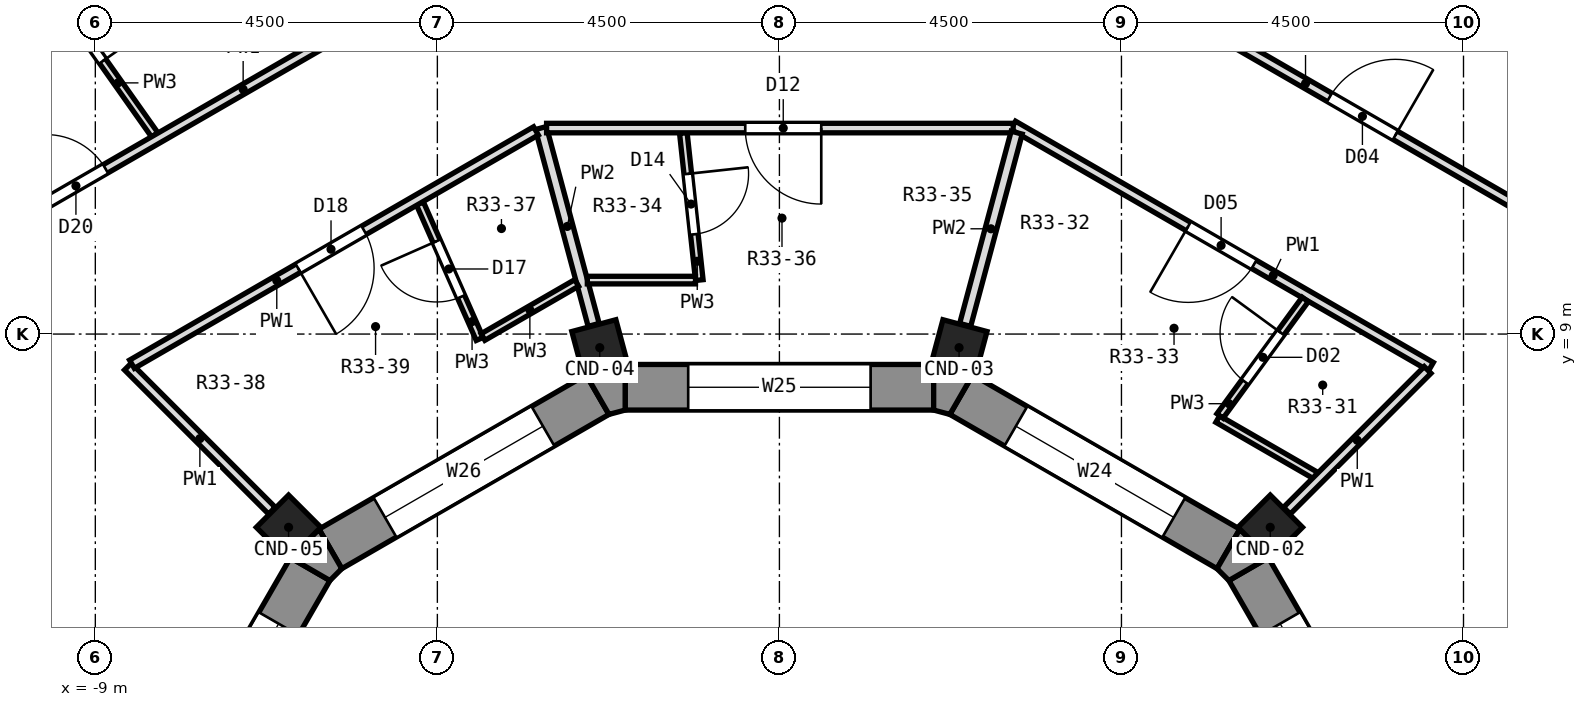
"""IFC4 building model, lengths in metres.
Left out: names, types, materials, properties, quantities, classifications, styles, units other than length and angle.
Written with IfcOpenShell. Run it as: python <this file> out.ifc"""

import sys

from ifc_helpers import new_model, si_unit, direction, frame, frame_2d, origin, origin_2d, place, context, subcontext, project, spatial, polyline, rectangle, outline, extrude, element, fill, save


model = new_model("IFC4")
c1 = context("Model", 3, precision=1e-05, world=origin(), true_north=direction((0.0, 1.0)))
c2 = subcontext(c1, "Body", "Model", "MODEL_VIEW")
j1 = project(units=[si_unit("LENGTHUNIT", "METRE"), si_unit("PLANEANGLEUNIT", "RADIAN")], contexts=[c1])
p1 = place(None, origin())
s1 = spatial("IfcSite", under=j1, at=p1, CompositionType="ELEMENT")
p2 = place(p1, origin())
s2 = spatial("IfcBuilding", under=s1, at=p2, CompositionType="ELEMENT")
p3 = place(p2, frame((0.0, 0.0, 229.7)))
s3 = spatial("IfcBuildingStorey", under=s2, at=p3, CompositionType="ELEMENT", Elevation=229.7)
for number, where, z_axis, x_axis in (
    (1, (6.458, 6.458, 0.0), (0.0, 0.0, 1.0), (0.707, 0.707, 0.0)),
    (2, (2.364, 8.821, 0.0), (0.0, 0.0, 1.0), (0.259, 0.966, 0.0)),
    (3, (-2.364, 8.821, 0.0), (0.0, 0.0, 1.0), (-0.259, 0.966, 0.0)),
    (4, (-6.458, 6.458, 0.0), (0.0, 0.0, 1.0), (-0.707, 0.707, 0.0)),
):
    element("IfcColumn", number, at=place(p3, frame(where, z_axis=z_axis, x_axis=x_axis)), inside=s3, PredefinedType="COLUMN", context=c2, shape_type="SweptSolid", body=[
        extrude(rectangle(XDim=0.6, YDim=0.6, at=origin_2d()), origin(), (0.0, 0.0, 1.0), 3.3),
    ])
p4 = place(p3, frame((8.203, 2.393, 0.0), z_axis=(0.0, 0.0, 1.0), x_axis=(-0.499994954979, 0.866028316509, 0.0)))
e5 = element("IfcWall", 5, at=p4, inside=s3, PredefinedType="SOLIDWALL", context=c2, shape_type="SweptSolid", body=[
    extrude(rectangle(XDim=4.059, YDim=0.6, at=frame_2d((2.029, 0.0))), origin(), (0.0, 0.0, 1.0), 2.9),
])
p5 = place(p4, frame((0.829, 0.0, 0.9)))
e6 = element("IfcOpeningElement", 6, at=p5, cuts=e5, PredefinedType="OPENING", context=c2, shape_type="SweptSolid", body=[
    extrude(rectangle(XDim=2.4, YDim=1.8, at=frame_2d((1.2, 0.9))), frame((0.0, 0.312, 0.0), z_axis=(0.0, -1.0, 0.0), x_axis=(1.0, 0.0, 0.0)), (0.0, 0.0, 1.0), 0.624),
])
p6 = place(p3, frame((5.907, 6.173, 0.0), z_axis=(0.0, 0.0, 1.0), x_axis=(-0.866028316509, 0.499994954979, 0.0)))
e7 = element("IfcWall", 7, at=p6, inside=s3, PredefinedType="SOLIDWALL", context=c2, shape_type="SweptSolid", body=[
    extrude(rectangle(XDim=4.059, YDim=0.6, at=frame_2d((2.029, 0.0))), origin(), (0.0, 0.0, 1.0), 2.9),
])
p7 = place(p6, frame((0.829, 0.0, 0.9)))
e8 = element("IfcOpeningElement", 8, at=p7, cuts=e7, PredefinedType="OPENING", context=c2, shape_type="SweptSolid", body=[
    extrude(rectangle(XDim=2.4, YDim=1.8, at=frame_2d((1.2, 0.9))), frame((0.0, 0.312, 0.0), z_axis=(0.0, -1.0, 0.0), x_axis=(1.0, 0.0, 0.0)), (0.0, 0.0, 1.0), 0.624),
])
p8 = place(p3, frame((2.029, 8.3, 0.0), z_axis=(0.0, 0.0, 1.0), x_axis=(-1.0, 0.0, 0.0)))
e9 = element("IfcWall", 9, at=p8, inside=s3, PredefinedType="SOLIDWALL", context=c2, shape_type="SweptSolid", body=[
    extrude(rectangle(XDim=4.059, YDim=0.6, at=frame_2d((2.029, 0.0))), origin(), (0.0, 0.0, 1.0), 2.9),
])
p9 = place(p8, frame((0.829, 0.0, 0.9)))
e10 = element("IfcOpeningElement", 10, at=p9, cuts=e9, PredefinedType="OPENING", context=c2, shape_type="SweptSolid", body=[
    extrude(rectangle(XDim=2.4, YDim=1.8, at=frame_2d((1.2, 0.9))), frame((0.0, 0.312, 0.0), z_axis=(0.0, -1.0, 0.0), x_axis=(1.0, 0.0, 0.0)), (0.0, 0.0, 1.0), 0.624),
])
p10 = place(p3, frame((-2.393, 8.203, 0.0), z_axis=(0.0, 0.0, 1.0), x_axis=(-0.866028316509, -0.499994954979, 0.0)))
e11 = element("IfcWall", 11, at=p10, inside=s3, PredefinedType="SOLIDWALL", context=c2, shape_type="SweptSolid", body=[
    extrude(rectangle(XDim=4.059, YDim=0.6, at=frame_2d((2.029, 0.0))), origin(), (0.0, 0.0, 1.0), 2.9),
])
p11 = place(p10, frame((0.829, 0.0, 0.9)))
e12 = element("IfcOpeningElement", 12, at=p11, cuts=e11, PredefinedType="OPENING", context=c2, shape_type="SweptSolid", body=[
    extrude(rectangle(XDim=2.4, YDim=1.8, at=frame_2d((1.2, 0.9))), frame((0.0, 0.312, 0.0), z_axis=(0.0, -1.0, 0.0), x_axis=(1.0, 0.0, 0.0)), (0.0, 0.0, 1.0), 0.624),
])
p12 = place(p3, frame((-6.173, 5.907, 0.0), z_axis=(0.0, 0.0, 1.0), x_axis=(-0.499994954979, -0.866028316509, 0.0)))
e13 = element("IfcWall", 13, at=p12, inside=s3, PredefinedType="SOLIDWALL", context=c2, shape_type="SweptSolid", body=[
    extrude(rectangle(XDim=4.059, YDim=0.6, at=frame_2d((2.029, 0.0))), origin(), (0.0, 0.0, 1.0), 2.9),
])
p13 = place(p12, frame((0.829, 0.0, 0.9)))
e14 = element("IfcOpeningElement", 14, at=p13, cuts=e13, PredefinedType="OPENING", context=c2, shape_type="SweptSolid", body=[
    extrude(rectangle(XDim=2.4, YDim=1.8, at=frame_2d((1.2, 0.9))), frame((0.0, 0.312, 0.0), z_axis=(0.0, -1.0, 0.0), x_axis=(1.0, 0.0, 0.0)), (0.0, 0.0, 1.0), 0.624),
])
p14 = place(p3, origin())
e15 = element("IfcWall", 15, at=p14, inside=s3, PredefinedType="SOLIDWALL", context=c2, shape_type="SweptSolid", body=[
    extrude(outline(polyline([(6.058, 6.433), (5.758, 5.914), (5.914, 5.758), (6.433, 6.058), (6.058, 6.433)])), origin(), (0.0, 0.0, 1.0), 2.9),
])
p15 = place(p3, origin())
e16 = element("IfcWall", 16, at=p15, inside=s3, PredefinedType="SOLIDWALL", context=c2, shape_type="SweptSolid", body=[
    extrude(outline(polyline([(2.029, 8.6), (2.029, 8.0), (2.242, 7.943), (2.542, 8.462), (2.029, 8.6)])), origin(), (0.0, 0.0, 1.0), 2.9),
])
p16 = place(p3, origin())
e17 = element("IfcWall", 17, at=p16, inside=s3, PredefinedType="SOLIDWALL", context=c2, shape_type="SweptSolid", body=[
    extrude(outline(polyline([(-2.542, 8.462), (-2.242, 7.943), (-2.029, 8.0), (-2.029, 8.6), (-2.542, 8.462)])), origin(), (0.0, 0.0, 1.0), 2.9),
])
p17 = place(p3, origin())
e18 = element("IfcWall", 18, at=p17, inside=s3, PredefinedType="SOLIDWALL", context=c2, shape_type="SweptSolid", body=[
    extrude(outline(polyline([(-6.433, 6.058), (-5.914, 5.758), (-5.758, 5.914), (-6.058, 6.433), (-6.433, 6.058)])), origin(), (0.0, 0.0, 1.0), 2.9),
])
p18 = place(p3, frame((-1.264, 11.648, 0.0), z_axis=(0.0, 0.0, 1.0), x_axis=(0.107833146159, -0.99416900605, 0.0)))
e19 = element("IfcWall", 19, at=p18, inside=s3, PredefinedType="PARTITIONING", context=c2, shape_type="SweptSolid", body=[
    extrude(rectangle(XDim=1.949, YDim=0.1, at=frame_2d((0.975, 0.0))), origin(), (0.0, 0.0, 1.0), 2.9),
])
p19 = place(p18, frame((0.543, 0.0, 0.0)))
e20 = element("IfcOpeningElement", 20, at=p19, cuts=e19, PredefinedType="OPENING", context=c2, shape_type="SweptSolid", body=[
    extrude(rectangle(XDim=0.8, YDim=2.1, at=frame_2d((0.4, 1.05))), frame((0.0, 0.062, 0.0), z_axis=(0.0, -1.0, 0.0), x_axis=(1.0, 0.0, 0.0)), (0.0, 0.0, 1.0), 0.124),
])
p20 = place(p3, frame((-3.138, 11.71, 0.0), z_axis=(0.0, 0.0, 1.0), x_axis=(0.258807397729, -0.965928947118, 0.0)))
e21 = element("IfcWall", 21, at=p20, inside=s3, PredefinedType="PARTITIONING", context=c2, shape_type="SweptSolid", body=[
    extrude(rectangle(XDim=2.681, YDim=0.15, at=frame_2d((1.34, 0.0))), origin(), (0.0, 0.0, 1.0), 2.9),
])
p21 = place(p3, frame((-4.73, 10.719, 0.0), z_axis=(0.0, 0.0, 1.0), x_axis=(0.403695730551, -0.914893303689, 0.0)))
e22 = element("IfcWall", 22, at=p21, inside=s3, PredefinedType="PARTITIONING", context=c2, shape_type="SweptSolid", body=[
    extrude(rectangle(XDim=1.948, YDim=0.1, at=frame_2d((0.974, 0.0))), origin(), (0.0, 0.0, 1.0), 2.9),
])
p22 = place(p21, frame((0.543, 0.0, 0.0)))
e23 = element("IfcOpeningElement", 23, at=p22, cuts=e22, PredefinedType="OPENING", context=c2, shape_type="SweptSolid", body=[
    extrude(rectangle(XDim=0.8, YDim=2.1, at=frame_2d((0.4, 1.05))), frame((0.0, 0.062, 0.0), z_axis=(0.0, -1.0, 0.0), x_axis=(1.0, 0.0, 0.0)), (0.0, 0.0, 1.0), 0.124),
])
p23 = place(p3, frame((-10.116, 14.305, 0.0), z_axis=(0.0, 0.0, 1.0), x_axis=(0.577184589489, -0.816613708957, 0.0)))
e24 = element("IfcWall", 24, at=p23, inside=s3, PredefinedType="PARTITIONING", context=c2, shape_type="SweptSolid", body=[
    extrude(rectangle(XDim=3.287, YDim=0.1, at=frame_2d((1.644, 0.0))), origin(), (0.0, 0.0, 1.0), 2.9),
])
p24 = place(p23, frame((1.2, 0.0, 0.0)))
e25 = element("IfcOpeningElement", 25, at=p24, cuts=e24, PredefinedType="OPENING", context=c2, shape_type="SweptSolid", body=[
    extrude(rectangle(XDim=0.9, YDim=2.1, at=frame_2d((0.45, 1.05))), frame((0.0, 0.062, 0.0), z_axis=(0.0, -1.0, 0.0), x_axis=(1.0, 0.0, 0.0)), (0.0, 0.0, 1.0), 0.124),
])
p25 = place(p3, frame((-8.572, 8.572, 0.0), z_axis=(0.0, 0.0, 1.0), x_axis=(0.707106781187, -0.707106781187, 0.0)))
e26 = element("IfcWall", 26, at=p25, inside=s3, PredefinedType="PARTITIONING", context=c2, shape_type="SweptSolid", body=[
    extrude(rectangle(XDim=2.68, YDim=0.125, at=frame_2d((1.34, 0.0))), origin(), (0.0, 0.0, 1.0), 2.9),
])
p26 = place(p3, frame((5.767, 7.882, 0.0), z_axis=(0.0, 0.0, 1.0), x_axis=(0.866040576453, -0.499973719246, 0.0)))
e27 = element("IfcWall", 27, at=p26, inside=s3, PredefinedType="PARTITIONING", context=c2, shape_type="SweptSolid", body=[
    extrude(rectangle(XDim=1.486, YDim=0.1, at=frame_2d((0.743, 0.0))), origin(), (0.0, 0.0, 1.0), 2.9),
])
p27 = place(p3, frame((3.075, 11.746, 0.0), z_axis=(0.0, 0.0, 1.0), x_axis=(0.865983161714, -0.500073158277, 0.0)))
e28 = element("IfcWall", 28, at=p27, inside=s3, PredefinedType="PARTITIONING", context=c2, shape_type="SweptSolid", body=[
    extrude(rectangle(XDim=6.347, YDim=0.125, at=frame_2d((3.174, 0.0))), origin(), (0.0, 0.0, 1.0), 2.9),
])
p28 = place(p27, frame((2.659, 0.0, 0.0)))
e29 = element("IfcOpeningElement", 29, at=p28, cuts=e28, PredefinedType="OPENING", context=c2, shape_type="SweptSolid", body=[
    extrude(rectangle(XDim=1.0, YDim=2.1, at=frame_2d((0.5, 1.05))), frame((0.0, 0.074, 0.0), z_axis=(0.0, -1.0, 0.0), x_axis=(1.0, 0.0, 0.0)), (0.0, 0.0, 1.0), 0.149),
])
p29 = place(p3, frame((3.718, 14.147, 0.0), z_axis=(0.0, 0.0, 1.0), x_axis=(0.866000791713, -0.500042626935, 0.0)))
e30 = element("IfcWall", 30, at=p29, inside=s3, PredefinedType="PARTITIONING", context=c2, shape_type="SweptSolid", body=[
    extrude(rectangle(XDim=7.635, YDim=0.125, at=frame_2d((3.817, 0.0))), origin(), (0.0, 0.0, 1.0), 2.9),
])
p30 = place(p29, frame((4.064, 0.0, 0.0)))
e31 = element("IfcOpeningElement", 31, at=p30, cuts=e30, PredefinedType="OPENING", context=c2, shape_type="SweptSolid", body=[
    extrude(rectangle(XDim=1.0, YDim=2.1, at=frame_2d((0.5, 1.05))), frame((0.0, 0.074, 0.0), z_axis=(0.0, -1.0, 0.0), x_axis=(1.0, 0.0, 0.0)), (0.0, 0.0, 1.0), 0.149),
])
p31 = place(p3, frame((-2.527, 9.71, 0.0), z_axis=(0.0, 0.0, 1.0), x_axis=(1.0, 0.0, 0.0)))
e32 = element("IfcWall", 32, at=p31, inside=s3, PredefinedType="PARTITIONING", context=c2, shape_type="SweptSolid", body=[
    extrude(rectangle(XDim=1.423, YDim=0.1, at=frame_2d((0.711, 0.0))), origin(), (0.0, 0.0, 1.0), 2.9),
])
p32 = place(p3, frame((-3.063, 11.71, 0.0), z_axis=(0.0, 0.0, 1.0), x_axis=(1.0, 0.0, 0.0)))
e33 = element("IfcWall", 33, at=p32, inside=s3, PredefinedType="PARTITIONING", context=c2, shape_type="SweptSolid", body=[
    extrude(rectangle(XDim=6.138, YDim=0.125, at=frame_2d((3.069, 0.0))), origin(), (0.0, 0.0, 1.0), 2.9),
])
p33 = place(p32, frame((2.614, 0.0, 0.0)))
e34 = element("IfcOpeningElement", 34, at=p33, cuts=e33, PredefinedType="OPENING", context=c2, shape_type="SweptSolid", body=[
    extrude(rectangle(XDim=1.0, YDim=2.1, at=frame_2d((0.5, 1.05))), frame((0.0, 0.074, 0.0), z_axis=(0.0, -1.0, 0.0), x_axis=(1.0, 0.0, 0.0)), (0.0, 0.0, 1.0), 0.149),
])
p34 = place(p3, frame((-3.9, 8.961, 0.0), z_axis=(0.0, 0.0, 1.0), x_axis=(0.866028486751, 0.499994660107, 0.0)))
e35 = element("IfcWall", 35, at=p34, inside=s3, PredefinedType="PARTITIONING", context=c2, shape_type="SweptSolid", body=[
    extrude(rectangle(XDim=1.423, YDim=0.1, at=frame_2d((0.712, 0.0))), origin(), (0.0, 0.0, 1.0), 2.9),
])
p35 = place(p3, frame((-8.518, 8.603, 0.0), z_axis=(0.0, 0.0, 1.0), x_axis=(0.865972267571, 0.50009202333, 0.0)))
e36 = element("IfcWall", 36, at=p35, inside=s3, PredefinedType="PARTITIONING", context=c2, shape_type="SweptSolid", body=[
    extrude(rectangle(XDim=6.137, YDim=0.125, at=frame_2d((3.069, 0.0))), origin(), (0.0, 0.0, 1.0), 2.9),
])
p36 = place(p35, frame((2.524, 0.0, 0.0)))
e37 = element("IfcOpeningElement", 37, at=p36, cuts=e36, PredefinedType="OPENING", context=c2, shape_type="SweptSolid", body=[
    extrude(rectangle(XDim=1.0, YDim=2.1, at=frame_2d((0.5, 1.05))), frame((0.0, 0.074, 0.0), z_axis=(0.0, -1.0, 0.0), x_axis=(1.0, 0.0, 0.0)), (0.0, 0.0, 1.0), 0.149),
])
p37 = place(p3, frame((-10.275, 10.36, 0.0), z_axis=(0.0, 0.0, 1.0), x_axis=(0.865993671729, 0.500054957505, 0.0)))
e38 = element("IfcWall", 38, at=p37, inside=s3, PredefinedType="PARTITIONING", context=c2, shape_type="SweptSolid", body=[
    extrude(rectangle(XDim=7.436, YDim=0.125, at=frame_2d((3.718, 0.0))), origin(), (0.0, 0.0, 1.0), 2.9),
])
p38 = place(p37, frame((0.728, 0.0, 0.0)))
e39 = element("IfcOpeningElement", 39, at=p38, cuts=e38, PredefinedType="OPENING", context=c2, shape_type="SweptSolid", body=[
    extrude(rectangle(XDim=0.9, YDim=2.1, at=frame_2d((0.45, 1.05))), frame((0.0, 0.074, 0.0), z_axis=(0.0, -1.0, 0.0), x_axis=(1.0, 0.0, 0.0)), (0.0, 0.0, 1.0), 0.149),
])
p39 = place(p3, frame((6.677, 6.677, 0.0), z_axis=(0.0, 0.0, 1.0), x_axis=(0.707106781187, 0.707106781187, 0.0)))
e40 = element("IfcWall", 40, at=p39, inside=s3, PredefinedType="PARTITIONING", context=c2, shape_type="SweptSolid", body=[
    extrude(rectangle(XDim=2.618, YDim=0.125, at=frame_2d((1.309, 0.0))), origin(), (0.0, 0.0, 1.0), 2.9),
])
p40 = place(p3, frame((5.797, 7.922, 0.0), z_axis=(0.0, 0.0, 1.0), x_axis=(0.59039359818, 0.807115480726, 0.0)))
e41 = element("IfcWall", 41, at=p40, inside=s3, PredefinedType="PARTITIONING", context=c2, shape_type="SweptSolid", body=[
    extrude(rectangle(XDim=1.899, YDim=0.1, at=frame_2d((0.95, 0.0))), origin(), (0.0, 0.0, 1.0), 2.9),
])
p41 = place(p40, frame((0.556, 0.0, 0.0)))
e42 = element("IfcOpeningElement", 42, at=p41, cuts=e41, PredefinedType="OPENING", context=c2, shape_type="SweptSolid", body=[
    extrude(rectangle(XDim=0.8, YDim=2.1, at=frame_2d((0.4, 1.05))), frame((0.0, 0.062, 0.0), z_axis=(0.0, -1.0, 0.0), x_axis=(1.0, 0.0, 0.0)), (0.0, 0.0, 1.0), 0.124),
])
p42 = place(p3, frame((2.444, 9.12, 0.0), z_axis=(0.0, 0.0, 1.0), x_axis=(0.258736085224, 0.965948051503, 0.0)))
e43 = element("IfcWall", 43, at=p42, inside=s3, PredefinedType="PARTITIONING", context=c2, shape_type="SweptSolid", body=[
    extrude(rectangle(XDim=2.618, YDim=0.15, at=frame_2d((1.309, 0.0))), origin(), (0.0, 0.0, 1.0), 2.9),
])
p43 = place(p5, origin())
e44 = element("IfcWindow", 44, at=p43, inside=s3, PartitioningType="SINGLE_PANEL", PredefinedType="WINDOW", context=c2, shape_type="SweptSolid", body=[
    extrude(rectangle(XDim=2.4, YDim=1.8, at=frame_2d((1.2, 0.9))), frame((0.0, -0.12, 0.0), z_axis=(0.0, -1.0, 0.0), x_axis=(1.0, 0.0, 0.0)), (0.0, 0.0, 1.0), 0.06),
])
fill(e6, e44)
p44 = place(p7, origin())
e45 = element("IfcWindow", 45, at=p44, inside=s3, PartitioningType="SINGLE_PANEL", PredefinedType="WINDOW", context=c2, shape_type="SweptSolid", body=[
    extrude(rectangle(XDim=2.4, YDim=1.8, at=frame_2d((1.2, 0.9))), frame((0.0, -0.12, 0.0), z_axis=(0.0, -1.0, 0.0), x_axis=(1.0, 0.0, 0.0)), (0.0, 0.0, 1.0), 0.06),
])
fill(e8, e45)
p45 = place(p9, origin())
e46 = element("IfcWindow", 46, at=p45, inside=s3, PartitioningType="SINGLE_PANEL", PredefinedType="WINDOW", context=c2, shape_type="SweptSolid", body=[
    extrude(rectangle(XDim=2.4, YDim=1.8, at=frame_2d((1.2, 0.9))), frame((0.0, -0.12, 0.0), z_axis=(0.0, -1.0, 0.0), x_axis=(1.0, 0.0, 0.0)), (0.0, 0.0, 1.0), 0.06),
])
fill(e10, e46)
p46 = place(p11, origin())
e47 = element("IfcWindow", 47, at=p46, inside=s3, PartitioningType="SINGLE_PANEL", PredefinedType="WINDOW", context=c2, shape_type="SweptSolid", body=[
    extrude(rectangle(XDim=2.4, YDim=1.8, at=frame_2d((1.2, 0.9))), frame((0.0, -0.12, 0.0), z_axis=(0.0, -1.0, 0.0), x_axis=(1.0, 0.0, 0.0)), (0.0, 0.0, 1.0), 0.06),
])
fill(e12, e47)
p47 = place(p13, origin())
e48 = element("IfcWindow", 48, at=p47, inside=s3, PartitioningType="SINGLE_PANEL", PredefinedType="WINDOW", context=c2, shape_type="SweptSolid", body=[
    extrude(rectangle(XDim=2.4, YDim=1.8, at=frame_2d((1.2, 0.9))), frame((0.0, -0.12, 0.0), z_axis=(0.0, -1.0, 0.0), x_axis=(1.0, 0.0, 0.0)), (0.0, 0.0, 1.0), 0.06),
])
fill(e14, e48)
p48 = place(p41, origin())
e49 = element("IfcDoor", 49, at=p48, inside=s3, OperationType="SINGLE_SWING_RIGHT", PredefinedType="DOOR", context=c2, shape_type="SweptSolid", body=[
    extrude(rectangle(XDim=0.8, YDim=2.1, at=frame_2d((0.4, 1.05))), frame((0.0, 0.025, 0.0), z_axis=(0.0, -1.0, 0.0), x_axis=(1.0, 0.0, 0.0)), (0.0, 0.0, 1.0), 0.05),
])
fill(e42, e49)
p49 = place(p30, origin())
e50 = element("IfcDoor", 50, at=p49, inside=s3, OperationType="SINGLE_SWING_RIGHT", PredefinedType="DOOR", context=c2, shape_type="SweptSolid", body=[
    extrude(rectangle(XDim=1.0, YDim=2.1, at=frame_2d((0.5, 1.05))), frame((0.0, 0.025, 0.0), z_axis=(0.0, -1.0, 0.0), x_axis=(1.0, 0.0, 0.0)), (0.0, 0.0, 1.0), 0.05),
])
fill(e31, e50)
p50 = place(p28, frame((1.0, 0.0, 0.0), z_axis=(0.0, 0.0, 1.0), x_axis=(-1.0, 0.0, 0.0)))
e51 = element("IfcDoor", 51, at=p50, inside=s3, OperationType="SINGLE_SWING_RIGHT", PredefinedType="DOOR", context=c2, shape_type="SweptSolid", body=[
    extrude(rectangle(XDim=1.0, YDim=2.1, at=frame_2d((0.5, 1.05))), frame((0.0, 0.025, 0.0), z_axis=(0.0, -1.0, 0.0), x_axis=(1.0, 0.0, 0.0)), (0.0, 0.0, 1.0), 0.05),
])
fill(e29, e51)
p51 = place(p33, frame((1.0, 0.0, 0.0), z_axis=(0.0, 0.0, 1.0), x_axis=(-1.0, 0.0, 0.0)))
e52 = element("IfcDoor", 52, at=p51, inside=s3, OperationType="SINGLE_SWING_LEFT", PredefinedType="DOOR", context=c2, shape_type="SweptSolid", body=[
    extrude(rectangle(XDim=1.0, YDim=2.1, at=frame_2d((0.5, 1.05))), frame((0.0, 0.025, 0.0), z_axis=(0.0, -1.0, 0.0), x_axis=(1.0, 0.0, 0.0)), (0.0, 0.0, 1.0), 0.05),
])
fill(e34, e52)
p52 = place(p19, origin())
e53 = element("IfcDoor", 53, at=p52, inside=s3, OperationType="SINGLE_SWING_LEFT", PredefinedType="DOOR", context=c2, shape_type="SweptSolid", body=[
    extrude(rectangle(XDim=0.8, YDim=2.1, at=frame_2d((0.4, 1.05))), frame((0.0, 0.025, 0.0), z_axis=(0.0, -1.0, 0.0), x_axis=(1.0, 0.0, 0.0)), (0.0, 0.0, 1.0), 0.05),
])
fill(e20, e53)
p53 = place(p22, frame((0.8, 0.0, 0.0), z_axis=(0.0, 0.0, 1.0), x_axis=(-1.0, 0.0, 0.0)))
e54 = element("IfcDoor", 54, at=p53, inside=s3, OperationType="SINGLE_SWING_RIGHT", PredefinedType="DOOR", context=c2, shape_type="SweptSolid", body=[
    extrude(rectangle(XDim=0.8, YDim=2.1, at=frame_2d((0.4, 1.05))), frame((0.0, 0.025, 0.0), z_axis=(0.0, -1.0, 0.0), x_axis=(1.0, 0.0, 0.0)), (0.0, 0.0, 1.0), 0.05),
])
fill(e23, e54)
p54 = place(p36, frame((1.0, 0.0, 0.0), z_axis=(0.0, 0.0, 1.0), x_axis=(-1.0, 0.0, 0.0)))
e55 = element("IfcDoor", 55, at=p54, inside=s3, OperationType="SINGLE_SWING_RIGHT", PredefinedType="DOOR", context=c2, shape_type="SweptSolid", body=[
    extrude(rectangle(XDim=1.0, YDim=2.1, at=frame_2d((0.5, 1.05))), frame((0.0, 0.025, 0.0), z_axis=(0.0, -1.0, 0.0), x_axis=(1.0, 0.0, 0.0)), (0.0, 0.0, 1.0), 0.05),
])
fill(e37, e55)
p55 = place(p24, origin())
e56 = element("IfcDoor", 56, at=p55, inside=s3, OperationType="SINGLE_SWING_RIGHT", PredefinedType="DOOR", context=c2, shape_type="SweptSolid", body=[
    extrude(rectangle(XDim=0.9, YDim=2.1, at=frame_2d((0.45, 1.05))), frame((0.0, 0.025, 0.0), z_axis=(0.0, -1.0, 0.0), x_axis=(1.0, 0.0, 0.0)), (0.0, 0.0, 1.0), 0.05),
])
fill(e25, e56)
p56 = place(p38, origin())
e57 = element("IfcDoor", 57, at=p56, inside=s3, OperationType="SINGLE_SWING_LEFT", PredefinedType="DOOR", context=c2, shape_type="SweptSolid", body=[
    extrude(rectangle(XDim=0.9, YDim=2.1, at=frame_2d((0.45, 1.05))), frame((0.0, 0.025, 0.0), z_axis=(0.0, -1.0, 0.0), x_axis=(1.0, 0.0, 0.0)), (0.0, 0.0, 1.0), 0.05),
])
fill(e39, e57)
save(model, sys.argv[1])
